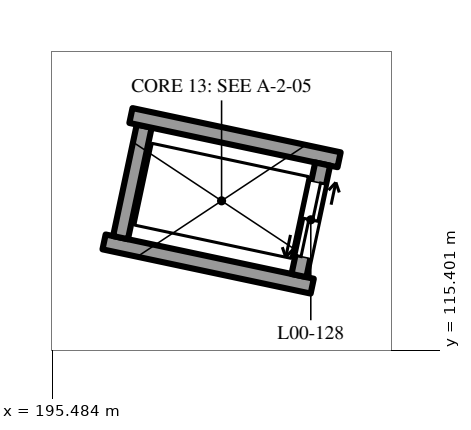
"""IFC4 building model, lengths in metres.
Left out: names, types, materials, properties, quantities, classifications, styles, units other than length and angle.
Written with IfcOpenShell. Run it as: python <this file> out.ifc"""

import sys

from ifc_helpers import new_model, si_unit, direction, frame, frame_2d, origin, place, context, subcontext, project, spatial, rectangle, extrude, element, fill, save


model = new_model("IFC4")
c1 = context("Model", 3, precision=1e-05, world=origin(), true_north=direction((0.0, 1.0)))
c2 = subcontext(c1, "Body", "Model", "MODEL_VIEW")
j1 = project(units=[si_unit("LENGTHUNIT", "METRE"), si_unit("PLANEANGLEUNIT", "RADIAN")], contexts=[c1])
p1 = place(None, origin())
s1 = spatial("IfcSite", under=j1, at=p1, CompositionType="ELEMENT")
p2 = place(p1, origin())
s2 = spatial("IfcBuilding", under=s1, at=p2, CompositionType="ELEMENT")
p3 = place(p2, origin())
s3 = spatial("IfcBuildingStorey", under=s2, at=p3, CompositionType="ELEMENT", Elevation=0.0)
p4 = place(p3, frame((196.164, 116.823, -1.2), z_axis=(0.0, 0.0, 1.0), x_axis=(0.978138015478, -0.207956780791, 0.0)))
e1 = element("IfcWall", 1, at=p4, inside=s3, PredefinedType="SOLIDWALL", context=c2, shape_type="SweptSolid", body=[
    extrude(rectangle(XDim=2.8, YDim=0.2, at=frame_2d((1.4, 0.0))), origin(), (0.0, 0.0, 1.0), 8.15),
])
p5 = place(p3, frame((196.381, 116.88, -1.2), z_axis=(0.0, 0.0, 1.0), x_axis=(0.20783929028, 0.978162987143, 0.0)))
e2 = element("IfcWall", 2, at=p5, inside=s3, PredefinedType="SOLIDWALL", context=c2, shape_type="SweptSolid", body=[
    extrude(rectangle(XDim=1.5, YDim=0.2, at=frame_2d((0.75, 0.0))), origin(), (0.0, 0.0, 1.0), 8.15),
])
p6 = place(p3, frame((196.518, 118.486, -1.2), z_axis=(0.0, 0.0, 1.0), x_axis=(0.978138015478, -0.207956780791, 0.0)))
e3 = element("IfcWall", 3, at=p6, inside=s3, PredefinedType="SOLIDWALL", context=c2, shape_type="SweptSolid", body=[
    extrude(rectangle(XDim=2.8, YDim=0.2, at=frame_2d((1.4, 0.0))), origin(), (0.0, 0.0, 1.0), 8.15),
])
p7 = place(p3, frame((198.728, 116.381, -1.2), z_axis=(0.0, 0.0, 1.0), x_axis=(0.207995007687, 0.978129887478, 0.0)))
e4 = element("IfcWall", 4, at=p7, inside=s3, PredefinedType="SOLIDWALL", context=c2, shape_type="SweptSolid", body=[
    extrude(rectangle(XDim=1.5, YDim=0.2, at=frame_2d((0.75, 0.0))), origin(), (0.0, 0.0, 1.0), 8.15),
])
p8 = place(p7, frame((0.25, 0.0, 1.2)))
e5 = element("IfcOpeningElement", 5, at=p8, cuts=e4, PredefinedType="OPENING", context=c2, shape_type="SweptSolid", body=[
    extrude(rectangle(XDim=1.0, YDim=2.1, at=frame_2d((0.5, 1.05))), frame((0.0, 0.11, 0.0), z_axis=(0.0, -1.0, 0.0), x_axis=(1.0, 0.0, 0.0)), (0.0, 0.0, 1.0), 0.22),
])
p9 = place(p3, frame((191.856, 105.215, -0.3), z_axis=(0.0, 0.0, 1.0), x_axis=(0.207914134202, 0.978147081373, 0.0)))
e6 = element("IfcWall", 6, at=p9, inside=s3, PredefinedType="SOLIDWALL", context=c2, shape_type="SweptSolid", body=[
    extrude(rectangle(XDim=36.75, YDim=0.2, at=frame_2d((18.375, 0.0))), origin(), (0.0, 0.0, 1.0), 7.5),
])
p10 = place(p9, frame((3.5, 0.0, 1.0)))
e7 = element("IfcOpeningElement", 7, at=p10, cuts=e6, PredefinedType="OPENING", context=c2, shape_type="SweptSolid", body=[
    extrude(rectangle(XDim=3.0, YDim=2.4, at=frame_2d((1.5, 1.2))), frame((0.0, 0.11, 0.0), z_axis=(0.0, -1.0, 0.0), x_axis=(1.0, 0.0, 0.0)), (0.0, 0.0, 1.0), 0.22),
])
p11 = place(p9, frame((9.5, 0.0, 1.0)))
e8 = element("IfcOpeningElement", 8, at=p11, cuts=e6, PredefinedType="OPENING", context=c2, shape_type="SweptSolid", body=[
    extrude(rectangle(XDim=3.0, YDim=2.4, at=frame_2d((1.5, 1.2))), frame((0.0, 0.11, 0.0), z_axis=(0.0, -1.0, 0.0), x_axis=(1.0, 0.0, 0.0)), (0.0, 0.0, 1.0), 0.22),
])
p12 = place(p9, frame((15.5, 0.0, 1.0)))
e9 = element("IfcOpeningElement", 9, at=p12, cuts=e6, PredefinedType="OPENING", context=c2, shape_type="SweptSolid", body=[
    extrude(rectangle(XDim=3.0, YDim=2.4, at=frame_2d((1.5, 1.2))), frame((0.0, 0.11, 0.0), z_axis=(0.0, -1.0, 0.0), x_axis=(1.0, 0.0, 0.0)), (0.0, 0.0, 1.0), 0.22),
])
p13 = place(p9, frame((21.5, 0.0, 1.0)))
e10 = element("IfcOpeningElement", 10, at=p13, cuts=e6, PredefinedType="OPENING", context=c2, shape_type="SweptSolid", body=[
    extrude(rectangle(XDim=3.0, YDim=2.4, at=frame_2d((1.5, 1.2))), frame((0.0, 0.11, 0.0), z_axis=(0.0, -1.0, 0.0), x_axis=(1.0, 0.0, 0.0)), (0.0, 0.0, 1.0), 0.22),
])
p14 = place(p9, frame((27.5, 0.0, 1.0)))
e11 = element("IfcOpeningElement", 11, at=p14, cuts=e6, PredefinedType="OPENING", context=c2, shape_type="SweptSolid", body=[
    extrude(rectangle(XDim=3.0, YDim=2.4, at=frame_2d((1.5, 1.2))), frame((0.0, 0.11, 0.0), z_axis=(0.0, -1.0, 0.0), x_axis=(1.0, 0.0, 0.0)), (0.0, 0.0, 1.0), 0.22),
])
p15 = place(p8, frame((1.0, 0.0, 0.0), z_axis=(0.0, 0.0, 1.0), x_axis=(-1.0, 0.0, 0.0)))
e12 = element("IfcDoor", 12, at=p15, inside=s3, OperationType="DOUBLE_DOOR_SLIDING", PredefinedType="DOOR", context=c2, shape_type="SweptSolid", body=[
    extrude(rectangle(XDim=1.0, YDim=2.1, at=frame_2d((0.5, 1.05))), frame((0.0, 0.025, 0.0), z_axis=(0.0, -1.0, 0.0), x_axis=(1.0, 0.0, 0.0)), (0.0, 0.0, 1.0), 0.05),
])
fill(e5, e12)
save(model, sys.argv[1])
